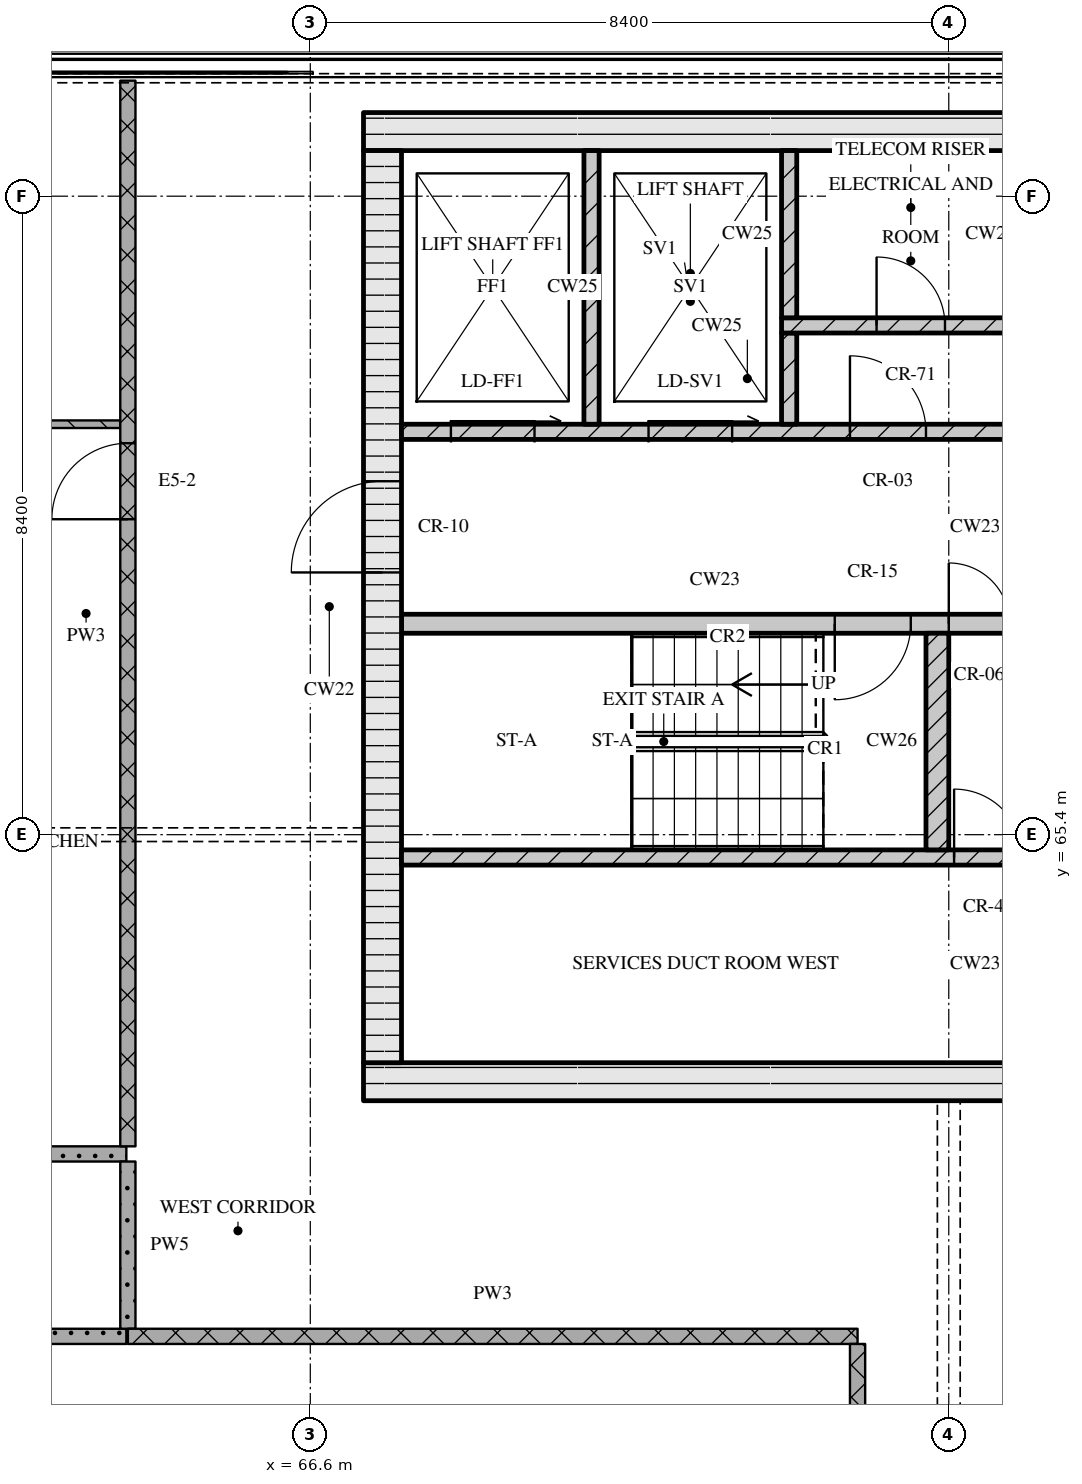
"""IFC4 building model, lengths in metres.
Left out: names, types, materials, properties, quantities, classifications, styles, units other than length and angle.
Written with IfcOpenShell. Run it as: python <this file> out.ifc"""

import sys

from ifc_helpers import new_model, si_unit, direction, frame, frame_2d, origin, place, context, subcontext, project, spatial, rectangle, extrude, element, fill, save


model = new_model("IFC4")
c1 = context("Model", 3, precision=1e-05, world=origin(), true_north=direction((0.0, 1.0)))
c2 = subcontext(c1, "Body", "Model", "MODEL_VIEW")
j1 = project(units=[si_unit("LENGTHUNIT", "METRE"), si_unit("PLANEANGLEUNIT", "RADIAN")], contexts=[c1])
p1 = place(None, origin())
s1 = spatial("IfcSite", under=j1, at=p1, CompositionType="ELEMENT")
p2 = place(p1, origin())
s2 = spatial("IfcBuilding", under=s1, at=p2, CompositionType="ELEMENT")
p3 = place(p2, frame((0.0, 0.0, 292.35)))
s3 = spatial("IfcBuildingStorey", under=s2, at=p3, CompositionType="ELEMENT", Elevation=292.35)
p4 = place(p3, frame((67.3, 62.15, 0.0), z_axis=(0.0, 0.0, 1.0), x_axis=(1.0, 0.0, 0.0)))
e1 = element("IfcWall", 1, at=p4, inside=s3, PredefinedType="SOLIDWALL", context=c2, shape_type="SweptSolid", body=[
    extrude(rectangle(XDim=40.6, YDim=0.5, at=frame_2d((20.3, 0.0))), origin(), (0.0, 0.0, 1.0), 3.32),
])
p5 = place(p4, frame((20.65, 0.0, 0.0)))
e2 = element("IfcOpeningElement", 2, at=p5, cuts=e1, PredefinedType="OPENING", context=c2, shape_type="SweptSolid", body=[
    extrude(rectangle(XDim=1.8, YDim=2.1, at=frame_2d((0.9, 1.05))), frame((0.0, 0.26, 0.0), z_axis=(0.0, -1.0, 0.0), x_axis=(1.0, 0.0, 0.0)), (0.0, 0.0, 1.0), 0.52),
])
p6 = place(p3, frame((67.3, 74.65, 0.0), z_axis=(0.0, 0.0, 1.0), x_axis=(1.0, 0.0, 0.0)))
e3 = element("IfcWall", 3, at=p6, inside=s3, PredefinedType="SOLIDWALL", context=c2, shape_type="SweptSolid", body=[
    extrude(rectangle(XDim=40.6, YDim=0.5, at=frame_2d((20.3, 0.0))), origin(), (0.0, 0.0, 1.0), 3.32),
])
p7 = place(p3, frame((67.55, 62.4, 0.0), z_axis=(0.0, 0.0, 1.0), x_axis=(0.0, 1.0, 0.0)))
e4 = element("IfcWall", 4, at=p7, inside=s3, PredefinedType="SOLIDWALL", context=c2, shape_type="SweptSolid", body=[
    extrude(rectangle(XDim=12.0, YDim=0.5, at=frame_2d((6.0, 0.0))), origin(), (0.0, 0.0, 1.0), 3.32),
])
p8 = place(p7, frame((6.45, 0.0, 0.0)))
e5 = element("IfcOpeningElement", 5, at=p8, cuts=e4, PredefinedType="OPENING", context=c2, shape_type="SweptSolid", body=[
    extrude(rectangle(XDim=1.2, YDim=2.1, at=frame_2d((0.6, 1.05))), frame((0.0, 0.26, 0.0), z_axis=(0.0, -1.0, 0.0), x_axis=(1.0, 0.0, 0.0)), (0.0, 0.0, 1.0), 0.52),
])
p9 = place(p3, frame((67.8, 65.1, 0.0), z_axis=(0.0, 0.0, 1.0), x_axis=(1.0, 0.0, 0.0)))
e6 = element("IfcWall", 6, at=p9, inside=s3, PredefinedType="SOLIDWALL", context=c2, shape_type="SweptSolid", body=[
    extrude(rectangle(XDim=18.5, YDim=0.2, at=frame_2d((9.25, 0.0))), origin(), (0.0, 0.0, 1.0), 3.32),
])
p10 = place(p9, frame((7.27, 0.0, 0.0)))
e7 = element("IfcOpeningElement", 7, at=p10, cuts=e6, PredefinedType="OPENING", context=c2, shape_type="SweptSolid", body=[
    extrude(rectangle(XDim=0.9, YDim=2.1, at=frame_2d((0.45, 1.05))), frame((0.0, 0.11, 0.0), z_axis=(0.0, -1.0, 0.0), x_axis=(1.0, 0.0, 0.0)), (0.0, 0.0, 1.0), 0.22),
])
p11 = place(p9, frame((8.95, 0.0, 0.0)))
e8 = element("IfcOpeningElement", 8, at=p11, cuts=e6, PredefinedType="OPENING", context=c2, shape_type="SweptSolid", body=[
    extrude(rectangle(XDim=0.9, YDim=2.1, at=frame_2d((0.45, 1.05))), frame((0.0, 0.11, 0.0), z_axis=(0.0, -1.0, 0.0), x_axis=(1.0, 0.0, 0.0)), (0.0, 0.0, 1.0), 0.22),
])
p12 = place(p9, frame((11.42, 0.0, 0.0)))
e9 = element("IfcOpeningElement", 9, at=p12, cuts=e6, PredefinedType="OPENING", context=c2, shape_type="SweptSolid", body=[
    extrude(rectangle(XDim=0.9, YDim=2.1, at=frame_2d((0.45, 1.05))), frame((0.0, 0.11, 0.0), z_axis=(0.0, -1.0, 0.0), x_axis=(1.0, 0.0, 0.0)), (0.0, 0.0, 1.0), 0.22),
])
p13 = place(p9, frame((13.92, 0.0, 0.0)))
e10 = element("IfcOpeningElement", 10, at=p13, cuts=e6, PredefinedType="OPENING", context=c2, shape_type="SweptSolid", body=[
    extrude(rectangle(XDim=0.9, YDim=2.1, at=frame_2d((0.45, 1.05))), frame((0.0, 0.11, 0.0), z_axis=(0.0, -1.0, 0.0), x_axis=(1.0, 0.0, 0.0)), (0.0, 0.0, 1.0), 0.22),
])
p14 = place(p9, frame((16.7, 0.0, 0.0)))
e11 = element("IfcOpeningElement", 11, at=p14, cuts=e6, PredefinedType="OPENING", context=c2, shape_type="SweptSolid", body=[
    extrude(rectangle(XDim=0.9, YDim=2.1, at=frame_2d((0.45, 1.05))), frame((0.0, 0.11, 0.0), z_axis=(0.0, -1.0, 0.0), x_axis=(1.0, 0.0, 0.0)), (0.0, 0.0, 1.0), 0.22),
])
p15 = place(p3, frame((74.85, 65.2, 0.0), z_axis=(0.0, 0.0, 1.0), x_axis=(0.0, 1.0, 0.0)))
e12 = element("IfcWall", 12, at=p15, inside=s3, PredefinedType="SOLIDWALL", context=c2, shape_type="SweptSolid", body=[
    extrude(rectangle(XDim=2.85, YDim=0.3, at=frame_2d((1.425, 0.0))), origin(), (0.0, 0.0, 1.0), 3.32),
])
p16 = place(p3, frame((67.8, 68.175, 0.0), z_axis=(0.0, 0.0, 1.0), x_axis=(1.0, 0.0, 0.0)))
e13 = element("IfcWall", 13, at=p16, inside=s3, PredefinedType="SOLIDWALL", context=c2, shape_type="SweptSolid", body=[
    extrude(rectangle(XDim=8.25, YDim=0.25, at=frame_2d((4.125, 0.0))), origin(), (0.0, 0.0, 1.0), 3.32),
])
p17 = place(p16, frame((5.7, 0.0, 0.0)))
e14 = element("IfcOpeningElement", 14, at=p17, cuts=e13, PredefinedType="OPENING", context=c2, shape_type="SweptSolid", body=[
    extrude(rectangle(XDim=1.0, YDim=2.1, at=frame_2d((0.5, 1.05))), frame((0.0, 0.135, 0.0), z_axis=(0.0, -1.0, 0.0), x_axis=(1.0, 0.0, 0.0)), (0.0, 0.0, 1.0), 0.27),
])
p18 = place(p16, frame((7.2, 0.0, 0.0)))
e15 = element("IfcOpeningElement", 15, at=p18, cuts=e13, PredefinedType="OPENING", context=c2, shape_type="SweptSolid", body=[
    extrude(rectangle(XDim=0.8, YDim=2.1, at=frame_2d((0.4, 1.05))), frame((0.0, 0.135, 0.0), z_axis=(0.0, -1.0, 0.0), x_axis=(1.0, 0.0, 0.0)), (0.0, 0.0, 1.0), 0.27),
])
p19 = place(p3, frame((67.8, 70.7, 0.0), z_axis=(0.0, 0.0, 1.0), x_axis=(1.0, 0.0, 0.0)))
e16 = element("IfcWall", 16, at=p19, inside=s3, PredefinedType="SOLIDWALL", context=c2, shape_type="SweptSolid", body=[
    extrude(rectangle(XDim=39.6, YDim=0.2, at=frame_2d((19.8, 0.0))), origin(), (0.0, 0.0, 1.0), 3.32),
])
p20 = place(p19, frame((0.65, 0.0, 0.0)))
e17 = element("IfcOpeningElement", 17, at=p20, cuts=e16, PredefinedType="OPENING", context=c2, shape_type="SweptSolid", body=[
    extrude(rectangle(XDim=1.1, YDim=2.1, at=frame_2d((0.55, 1.05))), frame((0.0, 0.11, 0.0), z_axis=(0.0, -1.0, 0.0), x_axis=(1.0, 0.0, 0.0)), (0.0, 0.0, 1.0), 0.22),
])
p21 = place(p19, frame((3.25, 0.0, 0.0)))
e18 = element("IfcOpeningElement", 18, at=p21, cuts=e16, PredefinedType="OPENING", context=c2, shape_type="SweptSolid", body=[
    extrude(rectangle(XDim=1.1, YDim=2.1, at=frame_2d((0.55, 1.05))), frame((0.0, 0.11, 0.0), z_axis=(0.0, -1.0, 0.0), x_axis=(1.0, 0.0, 0.0)), (0.0, 0.0, 1.0), 0.22),
])
p22 = place(p19, frame((5.9, 0.0, 0.0)))
e19 = element("IfcOpeningElement", 19, at=p22, cuts=e16, PredefinedType="OPENING", context=c2, shape_type="SweptSolid", body=[
    extrude(rectangle(XDim=1.0, YDim=2.1, at=frame_2d((0.5, 1.05))), frame((0.0, 0.11, 0.0), z_axis=(0.0, -1.0, 0.0), x_axis=(1.0, 0.0, 0.0)), (0.0, 0.0, 1.0), 0.22),
])
p23 = place(p19, frame((21.7, 0.0, 0.0)))
e20 = element("IfcOpeningElement", 20, at=p23, cuts=e16, PredefinedType="OPENING", context=c2, shape_type="SweptSolid", body=[
    extrude(rectangle(XDim=1.0, YDim=2.1, at=frame_2d((0.5, 1.05))), frame((0.0, 0.11, 0.0), z_axis=(0.0, -1.0, 0.0), x_axis=(1.0, 0.0, 0.0)), (0.0, 0.0, 1.0), 0.22),
])
p24 = place(p19, frame((32.7, 0.0, 0.0)))
e21 = element("IfcOpeningElement", 21, at=p24, cuts=e16, PredefinedType="OPENING", context=c2, shape_type="SweptSolid", body=[
    extrude(rectangle(XDim=1.0, YDim=2.1, at=frame_2d((0.5, 1.05))), frame((0.0, 0.11, 0.0), z_axis=(0.0, -1.0, 0.0), x_axis=(1.0, 0.0, 0.0)), (0.0, 0.0, 1.0), 0.22),
])
p25 = place(p19, frame((35.25, 0.0, 0.0)))
e22 = element("IfcOpeningElement", 22, at=p25, cuts=e16, PredefinedType="OPENING", context=c2, shape_type="SweptSolid", body=[
    extrude(rectangle(XDim=1.1, YDim=2.1, at=frame_2d((0.55, 1.05))), frame((0.0, 0.11, 0.0), z_axis=(0.0, -1.0, 0.0), x_axis=(1.0, 0.0, 0.0)), (0.0, 0.0, 1.0), 0.22),
])
p26 = place(p19, frame((37.85, 0.0, 0.0)))
e23 = element("IfcOpeningElement", 23, at=p26, cuts=e16, PredefinedType="OPENING", context=c2, shape_type="SweptSolid", body=[
    extrude(rectangle(XDim=1.1, YDim=2.1, at=frame_2d((0.55, 1.05))), frame((0.0, 0.11, 0.0), z_axis=(0.0, -1.0, 0.0), x_axis=(1.0, 0.0, 0.0)), (0.0, 0.0, 1.0), 0.22),
])
p27 = place(p3, frame((70.3, 70.8, 0.0), z_axis=(0.0, 0.0, 1.0), x_axis=(0.0, 1.0, 0.0)))
e24 = element("IfcWall", 24, at=p27, inside=s3, PredefinedType="SOLIDWALL", context=c2, shape_type="SweptSolid", body=[
    extrude(rectangle(XDim=3.6, YDim=0.2, at=frame_2d((1.8, 0.0))), origin(), (0.0, 0.0, 1.0), 3.32),
])
p28 = place(p3, frame((72.9, 70.8, 0.0), z_axis=(0.0, 0.0, 1.0), x_axis=(0.0, 1.0, 0.0)))
e25 = element("IfcWall", 25, at=p28, inside=s3, PredefinedType="SOLIDWALL", context=c2, shape_type="SweptSolid", body=[
    extrude(rectangle(XDim=1.2, YDim=0.2, at=frame_2d((0.6, 0.0))), origin(), (0.0, 0.0, 1.0), 3.32),
])
p29 = place(p3, frame((72.8, 72.1, 0.0), z_axis=(0.0, 0.0, 1.0), x_axis=(1.0, 0.0, 0.0)))
e26 = element("IfcWall", 26, at=p29, inside=s3, PredefinedType="SOLIDWALL", context=c2, shape_type="SweptSolid", body=[
    extrude(rectangle(XDim=11.0, YDim=0.2, at=frame_2d((5.5, 0.0))), origin(), (0.0, 0.0, 1.0), 3.32),
])
p30 = place(p29, frame((1.25, 0.0, 0.0)))
e27 = element("IfcOpeningElement", 27, at=p30, cuts=e26, PredefinedType="OPENING", context=c2, shape_type="SweptSolid", body=[
    extrude(rectangle(XDim=0.9, YDim=2.1, at=frame_2d((0.45, 1.05))), frame((0.0, 0.11, 0.0), z_axis=(0.0, -1.0, 0.0), x_axis=(1.0, 0.0, 0.0)), (0.0, 0.0, 1.0), 0.22),
])
p31 = place(p29, frame((3.85, 0.0, 0.0)))
e28 = element("IfcOpeningElement", 28, at=p31, cuts=e26, PredefinedType="OPENING", context=c2, shape_type="SweptSolid", body=[
    extrude(rectangle(XDim=0.9, YDim=2.1, at=frame_2d((0.45, 1.05))), frame((0.0, 0.11, 0.0), z_axis=(0.0, -1.0, 0.0), x_axis=(1.0, 0.0, 0.0)), (0.0, 0.0, 1.0), 0.22),
])
p32 = place(p29, frame((6.42, 0.0, 0.0)))
e29 = element("IfcOpeningElement", 29, at=p32, cuts=e26, PredefinedType="OPENING", context=c2, shape_type="SweptSolid", body=[
    extrude(rectangle(XDim=0.9, YDim=2.1, at=frame_2d((0.45, 1.05))), frame((0.0, 0.11, 0.0), z_axis=(0.0, -1.0, 0.0), x_axis=(1.0, 0.0, 0.0)), (0.0, 0.0, 1.0), 0.22),
])
p33 = place(p29, frame((9.195, 0.0, 0.0)))
e30 = element("IfcOpeningElement", 30, at=p33, cuts=e26, PredefinedType="OPENING", context=c2, shape_type="SweptSolid", body=[
    extrude(rectangle(XDim=0.9, YDim=2.1, at=frame_2d((0.45, 1.05))), frame((0.0, 0.11, 0.0), z_axis=(0.0, -1.0, 0.0), x_axis=(1.0, 0.0, 0.0)), (0.0, 0.0, 1.0), 0.22),
])
p34 = place(p3, frame((72.9, 72.2, 0.0), z_axis=(0.0, 0.0, 1.0), x_axis=(0.0, 1.0, 0.0)))
e31 = element("IfcWall", 31, at=p34, inside=s3, PredefinedType="SOLIDWALL", context=c2, shape_type="SweptSolid", body=[
    extrude(rectangle(XDim=2.2, YDim=0.2, at=frame_2d((1.1, 0.0))), origin(), (0.0, 0.0, 1.0), 3.32),
])
p35 = place(p3, frame((64.2, 58.8, 0.0), z_axis=(0.0, 0.0, 1.0), x_axis=(1.0, 0.0, 0.0)))
e32 = element("IfcWall", 32, at=p35, inside=s3, PredefinedType="PARTITIONING", context=c2, shape_type="SweptSolid", body=[
    extrude(rectangle(XDim=9.6, YDim=0.2, at=frame_2d((4.8, 0.0))), origin(), (0.0, 0.0, 1.0), 3.32),
])
p36 = place(p3, frame((56.7, 58.8, 0.0), z_axis=(0.0, 0.0, 1.0), x_axis=(1.0, 0.0, 0.0)))
e33 = element("IfcWall", 33, at=p36, inside=s3, PredefinedType="PARTITIONING", context=c2, shape_type="SweptSolid", body=[
    extrude(rectangle(XDim=7.48, YDim=0.2, at=frame_2d((3.74, 0.0))), origin(), (0.0, 0.0, 1.0), 3.32),
])
p37 = place(p3, frame((61.52, 61.2, 0.0), z_axis=(0.0, 0.0, 1.0), x_axis=(1.0, 0.0, 0.0)))
e34 = element("IfcWall", 34, at=p37, inside=s3, PredefinedType="PARTITIONING", context=c2, shape_type="SweptSolid", body=[
    extrude(rectangle(XDim=2.66, YDim=0.2, at=frame_2d((1.33, 0.0))), origin(), (0.0, 0.0, 1.0), 3.32),
])
p38 = place(p3, frame((61.5, 70.8, 0.0), z_axis=(0.0, 0.0, 1.0), x_axis=(1.0, 0.0, 0.0)))
e35 = element("IfcWall", 35, at=p38, inside=s3, PredefinedType="PARTITIONING", context=c2, shape_type="SweptSolid", body=[
    extrude(rectangle(XDim=2.6, YDim=0.1, at=frame_2d((1.3, 0.0))), origin(), (0.0, 0.0, 1.0), 3.32),
])
p39 = place(p3, frame((64.2, 61.3, 0.0), z_axis=(0.0, 0.0, 1.0), x_axis=(0.0, 1.0, 0.0)))
e36 = element("IfcWall", 36, at=p39, inside=s3, PredefinedType="PARTITIONING", context=c2, shape_type="SweptSolid", body=[
    extrude(rectangle(XDim=14.02, YDim=0.2, at=frame_2d((7.01, 0.0))), origin(), (0.0, 0.0, 1.0), 3.32),
])
p40 = place(p39, frame((8.25, 0.0, 0.0)))
e37 = element("IfcOpeningElement", 37, at=p40, cuts=e36, PredefinedType="OPENING", context=c2, shape_type="SweptSolid", body=[
    extrude(rectangle(XDim=1.0, YDim=2.1, at=frame_2d((0.5, 1.05))), frame((0.0, 0.11, 0.0), z_axis=(0.0, -1.0, 0.0), x_axis=(1.0, 0.0, 0.0)), (0.0, 0.0, 1.0), 0.22),
])
p41 = place(p3, frame((64.2, 61.1, 0.0), z_axis=(0.0, 0.0, 1.0), x_axis=(0.0, -1.0, 0.0)))
e38 = element("IfcWall", 38, at=p41, inside=s3, PredefinedType="PARTITIONING", context=c2, shape_type="SweptSolid", body=[
    extrude(rectangle(XDim=2.2, YDim=0.2, at=frame_2d((1.1, 0.0))), origin(), (0.0, 0.0, 1.0), 3.32),
])
p42 = place(p3, frame((73.8, 50.7, 0.0), z_axis=(0.0, 0.0, 1.0), x_axis=(0.0, 1.0, 0.0)))
e39 = element("IfcWall", 39, at=p42, inside=s3, PredefinedType="PARTITIONING", context=c2, shape_type="SweptSolid", body=[
    extrude(rectangle(XDim=8.0, YDim=0.2, at=frame_2d((4.0, 0.0))), origin(), (0.0, 0.0, 1.0), 3.32),
])
p43 = place(p42, frame((4.15, 0.0, 0.0)))
e40 = element("IfcOpeningElement", 40, at=p43, cuts=e39, PredefinedType="OPENING", context=c2, shape_type="SweptSolid", body=[
    extrude(rectangle(XDim=1.0, YDim=2.1, at=frame_2d((0.5, 1.05))), frame((0.0, 0.11, 0.0), z_axis=(0.0, -1.0, 0.0), x_axis=(1.0, 0.0, 0.0)), (0.0, 0.0, 1.0), 0.22),
])
p44 = place(p10, origin())
e41 = element("IfcDoor", 41, at=p44, inside=s3, OperationType="SINGLE_SWING_LEFT", PredefinedType="DOOR", context=c2, shape_type="SweptSolid", body=[
    extrude(rectangle(XDim=0.9, YDim=2.1, at=frame_2d((0.45, 1.05))), frame((0.0, 0.025, 0.0), z_axis=(0.0, -1.0, 0.0), x_axis=(1.0, 0.0, 0.0)), (0.0, 0.0, 1.0), 0.05),
])
fill(e7, e41)
p45 = place(p17, origin())
e42 = element("IfcDoor", 42, at=p45, inside=s3, OperationType="SINGLE_SWING_RIGHT", PredefinedType="DOOR", context=c2, shape_type="SweptSolid", body=[
    extrude(rectangle(XDim=1.0, YDim=2.1, at=frame_2d((0.5, 1.05))), frame((0.0, 0.025, 0.0), z_axis=(0.0, -1.0, 0.0), x_axis=(1.0, 0.0, 0.0)), (0.0, 0.0, 1.0), 0.05),
])
fill(e14, e42)
p46 = place(p18, origin())
e43 = element("IfcDoor", 43, at=p46, inside=s3, OperationType="SINGLE_SWING_LEFT", PredefinedType="DOOR", context=c2, shape_type="SweptSolid", body=[
    extrude(rectangle(XDim=0.8, YDim=2.1, at=frame_2d((0.4, 1.05))), frame((0.0, 0.025, 0.0), z_axis=(0.0, -1.0, 0.0), x_axis=(1.0, 0.0, 0.0)), (0.0, 0.0, 1.0), 0.05),
])
fill(e15, e43)
p47 = place(p8, origin())
e44 = element("IfcDoor", 44, at=p47, inside=s3, OperationType="SINGLE_SWING_LEFT", PredefinedType="DOOR", context=c2, shape_type="SweptSolid", body=[
    extrude(rectangle(XDim=1.2, YDim=2.1, at=frame_2d((0.6, 1.05))), frame((0.0, 0.025, 0.0), z_axis=(0.0, -1.0, 0.0), x_axis=(1.0, 0.0, 0.0)), (0.0, 0.0, 1.0), 0.05),
])
fill(e5, e44)
p48 = place(p20, origin())
e45 = element("IfcDoor", 45, at=p48, inside=s3, OperationType="SLIDING_TO_RIGHT", PredefinedType="DOOR", context=c2, shape_type="SweptSolid", body=[
    extrude(rectangle(XDim=1.1, YDim=2.1, at=frame_2d((0.55, 1.05))), frame((0.0, 0.025, 0.0), z_axis=(0.0, -1.0, 0.0), x_axis=(1.0, 0.0, 0.0)), (0.0, 0.0, 1.0), 0.05),
])
fill(e17, e45)
p49 = place(p21, origin())
e46 = element("IfcDoor", 46, at=p49, inside=s3, OperationType="SLIDING_TO_RIGHT", PredefinedType="DOOR", context=c2, shape_type="SweptSolid", body=[
    extrude(rectangle(XDim=1.1, YDim=2.1, at=frame_2d((0.55, 1.05))), frame((0.0, 0.025, 0.0), z_axis=(0.0, -1.0, 0.0), x_axis=(1.0, 0.0, 0.0)), (0.0, 0.0, 1.0), 0.05),
])
fill(e18, e46)
p50 = place(p22, origin())
e47 = element("IfcDoor", 47, at=p50, inside=s3, OperationType="SINGLE_SWING_LEFT", PredefinedType="DOOR", context=c2, shape_type="SweptSolid", body=[
    extrude(rectangle(XDim=1.0, YDim=2.1, at=frame_2d((0.5, 1.05))), frame((0.0, 0.025, 0.0), z_axis=(0.0, -1.0, 0.0), x_axis=(1.0, 0.0, 0.0)), (0.0, 0.0, 1.0), 0.05),
])
fill(e19, e47)
p51 = place(p30, origin())
e48 = element("IfcDoor", 48, at=p51, inside=s3, OperationType="SINGLE_SWING_LEFT", PredefinedType="DOOR", context=c2, shape_type="SweptSolid", body=[
    extrude(rectangle(XDim=0.9, YDim=2.1, at=frame_2d((0.45, 1.05))), frame((0.0, 0.025, 0.0), z_axis=(0.0, -1.0, 0.0), x_axis=(1.0, 0.0, 0.0)), (0.0, 0.0, 1.0), 0.05),
])
fill(e27, e48)
p52 = place(p40, origin())
e49 = element("IfcDoor", 49, at=p52, inside=s3, OperationType="SINGLE_SWING_LEFT", PredefinedType="DOOR", context=c2, shape_type="SweptSolid", body=[
    extrude(rectangle(XDim=1.0, YDim=2.1, at=frame_2d((0.5, 1.05))), frame((0.0, 0.025, 0.0), z_axis=(0.0, -1.0, 0.0), x_axis=(1.0, 0.0, 0.0)), (0.0, 0.0, 1.0), 0.05),
])
fill(e37, e49)
save(model, sys.argv[1])
